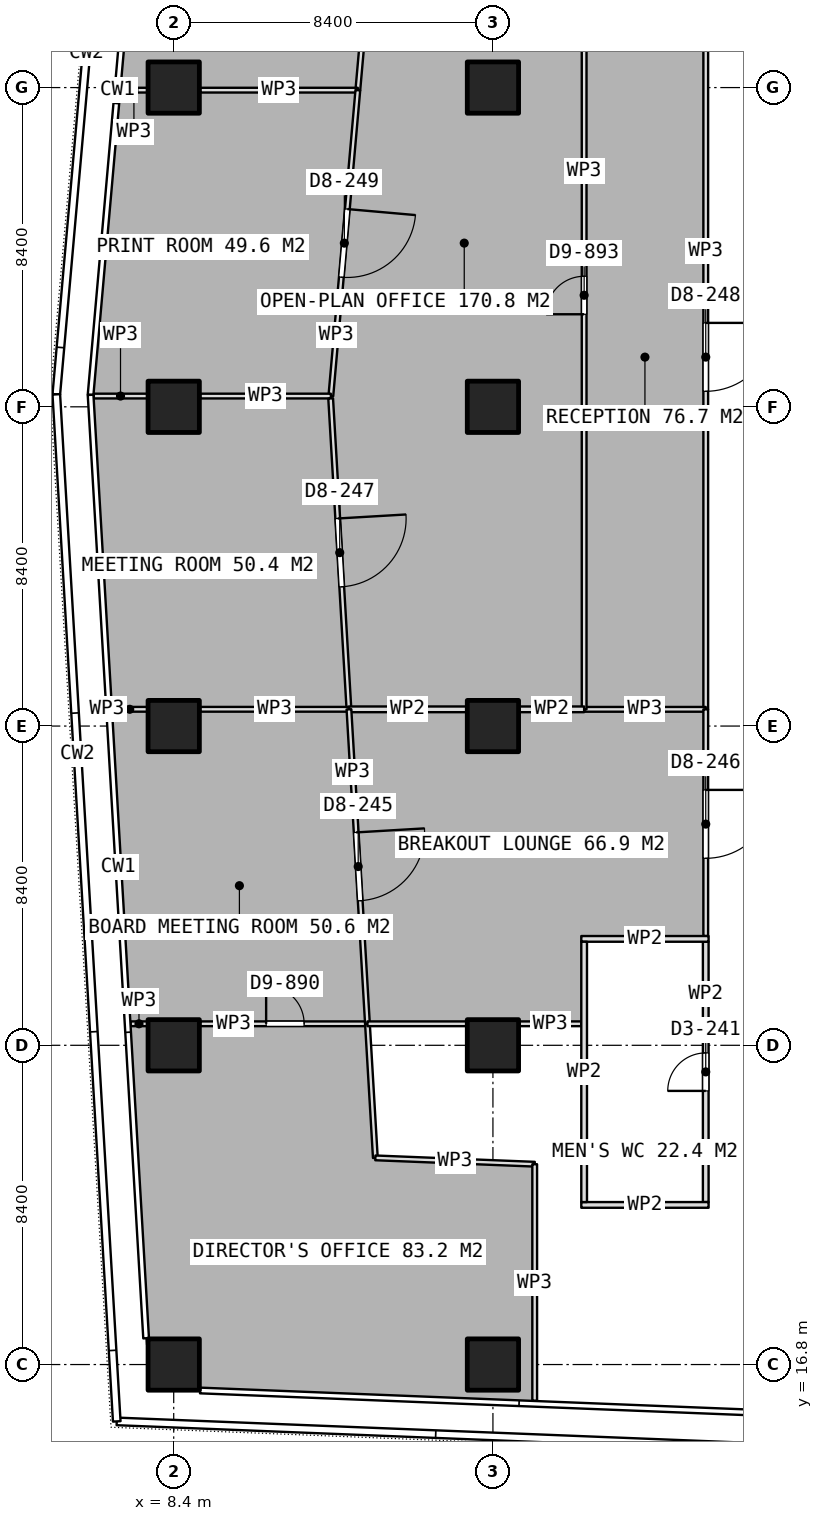
"""IFC4 building model, lengths in metres.
Left out: names, types, materials, properties, quantities, classifications, styles, units other than length and angle.
Written with IfcOpenShell. Run it as: python <this file> out.ifc"""

import sys

from ifc_helpers import new_model, si_unit, direction, frame, frame_2d, origin, origin_2d, place, context, subcontext, project, spatial, rectangle, extrude, element, fill, save


model = new_model("IFC4")
c1 = context("Model", 3, precision=1e-05, world=origin(), true_north=direction((0.0, 1.0)))
c2 = subcontext(c1, "Body", "Model", "MODEL_VIEW")
j1 = project(units=[si_unit("LENGTHUNIT", "METRE"), si_unit("PLANEANGLEUNIT", "RADIAN")], contexts=[c1])
p1 = place(None, origin())
s1 = spatial("IfcSite", under=j1, at=p1, CompositionType="ELEMENT")
p2 = place(p1, origin())
s2 = spatial("IfcBuilding", under=s1, at=p2, CompositionType="ELEMENT")
p3 = place(p2, frame((0.0, 0.0, 225.2)))
s3 = spatial("IfcBuildingStorey", under=s2, at=p3, CompositionType="ELEMENT", Elevation=225.2)
for number, where, z_axis, x_axis in (
    (1, (8.4, 16.8, 0.0), (0.0, 0.0, 1.0), (1.0, 0.0, 0.0)),
    (2, (8.4, 25.2, 0.0), (0.0, 0.0, 1.0), (1.0, 0.0, 0.0)),
    (3, (8.4, 33.6, 0.0), (0.0, 0.0, 1.0), (1.0, 0.0, 0.0)),
    (4, (8.4, 42.0, 0.0), (0.0, 0.0, 1.0), (1.0, 0.0, 0.0)),
    (5, (8.4, 50.4, 0.0), (0.0, 0.0, 1.0), (1.0, 0.0, 0.0)),
    (6, (16.8, 16.8, 0.0), (0.0, 0.0, 1.0), (1.0, 0.0, 0.0)),
    (7, (16.8, 25.2, 0.0), (0.0, 0.0, 1.0), (1.0, 0.0, 0.0)),
    (8, (16.8, 33.6, 0.0), (0.0, 0.0, 1.0), (1.0, 0.0, 0.0)),
    (9, (16.8, 42.0, 0.0), (0.0, 0.0, 1.0), (1.0, 0.0, 0.0)),
    (10, (16.8, 50.4, 0.0), (0.0, 0.0, 1.0), (1.0, 0.0, 0.0)),
):
    element("IfcColumn", number, at=place(p3, frame(where, z_axis=z_axis, x_axis=x_axis)), inside=s3, PredefinedType="COLUMN", context=c2, shape_type="SweptSolid", body=[
        extrude(rectangle(XDim=1.35, YDim=1.35, at=origin_2d()), origin(), (0.0, 0.0, 1.0), 3.75),
    ])
for number, where, z_axis, x_axis in (
    (11, (19.125, 21.0, 0.0), (0.0, 0.0, 1.0), (1.0, 0.0, 0.0)),
    (12, (19.125, 28.0, 0.0), (0.0, 0.0, 1.0), (1.0, 0.0, 0.0)),
):
    element("IfcWall", number, at=place(p3, frame(where, z_axis=z_axis, x_axis=x_axis)), inside=s3, PredefinedType="PARTITIONING", context=c2, shape_type="SweptSolid", body=[
        extrude(rectangle(XDim=3.35, YDim=0.15, at=frame_2d((1.675, 0.0))), origin(), (0.0, 0.0, 1.0), 3.5),
    ])
p4 = place(p3, frame((19.2, 21.075, 0.0), z_axis=(0.0, 0.0, 1.0), x_axis=(0.0, 1.0, 0.0)))
e13 = element("IfcWall", 13, at=p4, inside=s3, PredefinedType="PARTITIONING", context=c2, shape_type="SweptSolid", body=[
    extrude(rectangle(XDim=6.85, YDim=0.15, at=frame_2d((3.425, 0.0))), origin(), (0.0, 0.0, 1.0), 3.5),
])
p5 = place(p3, frame((22.4, 21.075, 0.0), z_axis=(0.0, 0.0, 1.0), x_axis=(0.0, 1.0, 0.0)))
e14 = element("IfcWall", 14, at=p5, inside=s3, PredefinedType="PARTITIONING", context=c2, shape_type="SweptSolid", body=[
    extrude(rectangle(XDim=6.85, YDim=0.15, at=frame_2d((3.425, 0.0))), origin(), (0.0, 0.0, 1.0), 3.5),
])
p6 = place(p5, frame((2.925, 0.0, 0.0)))
e15 = element("IfcOpeningElement", 15, at=p6, cuts=e14, PredefinedType="OPENING", context=c2, shape_type="SweptSolid", body=[
    extrude(rectangle(XDim=1.0, YDim=2.1, at=frame_2d((0.5, 1.05))), frame((0.0, 0.085, 0.0), z_axis=(0.0, -1.0, 0.0), x_axis=(1.0, 0.0, 0.0)), (0.0, 0.0, 1.0), 0.17),
])
p7 = place(p3, frame((13.593, 54.27, 0.0), z_axis=(0.0, 0.0, 1.0), x_axis=(-0.088001948608, -0.996120302494, 0.0)))
e16 = element("IfcWall", 16, at=p7, inside=s3, PredefinedType="PARTITIONING", context=c2, shape_type="SweptSolid", body=[
    extrude(rectangle(XDim=3.953, YDim=0.125, at=frame_2d((1.977, 0.0))), origin(), (0.0, 0.0, 1.0), 3.5),
])
p8 = place(p3, frame((13.245, 50.332, 0.0), z_axis=(0.0, 0.0, 1.0), x_axis=(-1.0, 0.0, 0.0)))
e17 = element("IfcWall", 17, at=p8, inside=s3, PredefinedType="PARTITIONING", context=c2, shape_type="SweptSolid", body=[
    extrude(rectangle(XDim=4.15, YDim=0.125, at=frame_2d((2.075, 0.0))), origin(), (0.0, 0.0, 1.0), 3.5),
])
p9 = place(p3, frame((7.705, 50.332, 0.0), z_axis=(0.0, 0.0, 1.0), x_axis=(-1.0, 0.0, 0.0)))
e18 = element("IfcWall", 18, at=p9, inside=s3, PredefinedType="PARTITIONING", context=c2, shape_type="SweptSolid", body=[
    extrude(rectangle(XDim=0.704, YDim=0.125, at=frame_2d((0.352, 0.0))), origin(), (0.0, 0.0, 1.0), 3.5),
])
p10 = place(p3, frame((13.245, 50.331, 0.0), z_axis=(0.0, 0.0, 1.0), x_axis=(-0.087903511106, -0.996128994024, 0.0)))
e19 = element("IfcWall", 19, at=p10, inside=s3, PredefinedType="PARTITIONING", context=c2, shape_type="SweptSolid", body=[
    extrude(rectangle(XDim=8.079, YDim=0.125, at=frame_2d((4.04, 0.0))), origin(), (0.0, 0.0, 1.0), 3.5),
])
p11 = place(p10, frame((3.14, 0.0, 0.0)))
e20 = element("IfcOpeningElement", 20, at=p11, cuts=e19, PredefinedType="OPENING", context=c2, shape_type="SweptSolid", body=[
    extrude(rectangle(XDim=1.8, YDim=2.1, at=frame_2d((0.9, 1.05))), frame((0.0, 0.073, 0.0), z_axis=(0.0, -1.0, 0.0), x_axis=(1.0, 0.0, 0.0)), (0.0, 0.0, 1.0), 0.145),
])
p12 = place(p3, frame((12.535, 42.283, 0.0), z_axis=(0.0, 0.0, 1.0), x_axis=(-1.0, 0.0, 0.0)))
e21 = element("IfcWall", 21, at=p12, inside=s3, PredefinedType="PARTITIONING", context=c2, shape_type="SweptSolid", body=[
    extrude(rectangle(XDim=3.44, YDim=0.125, at=frame_2d((1.72, 0.0))), origin(), (0.0, 0.0, 1.0), 3.5),
])
p13 = place(p3, frame((7.705, 42.283, 0.0), z_axis=(0.0, 0.0, 1.0), x_axis=(-1.0, 0.0, 0.0)))
e22 = element("IfcWall", 22, at=p13, inside=s3, PredefinedType="PARTITIONING", context=c2, shape_type="SweptSolid", body=[
    extrude(rectangle(XDim=1.41, YDim=0.125, at=frame_2d((0.705, 0.0))), origin(), (0.0, 0.0, 1.0), 3.5),
])
p14 = place(p3, frame((12.53, 42.221, 0.0), z_axis=(0.0, 0.0, 1.0), x_axis=(0.058695823025, -0.998275913943, 0.0)))
e23 = element("IfcWall", 23, at=p14, inside=s3, PredefinedType="PARTITIONING", context=c2, shape_type="SweptSolid", body=[
    extrude(rectangle(XDim=8.194, YDim=0.125, at=frame_2d((4.097, 0.0))), origin(), (0.0, 0.0, 1.0), 3.5),
])
p15 = place(p14, frame((3.165, 0.0, 0.0)))
e24 = element("IfcOpeningElement", 24, at=p15, cuts=e23, PredefinedType="OPENING", context=c2, shape_type="SweptSolid", body=[
    extrude(rectangle(XDim=1.8, YDim=2.1, at=frame_2d((0.9, 1.05))), frame((0.0, 0.073, 0.0), z_axis=(0.0, -1.0, 0.0), x_axis=(1.0, 0.0, 0.0)), (0.0, 0.0, 1.0), 0.145),
])
p16 = place(p3, frame((13.011, 34.041, 0.0), z_axis=(0.0, 0.0, 1.0), x_axis=(-1.0, 0.0, 0.0)))
e25 = element("IfcWall", 25, at=p16, inside=s3, PredefinedType="PARTITIONING", context=c2, shape_type="SweptSolid", body=[
    extrude(rectangle(XDim=3.916, YDim=0.125, at=frame_2d((1.958, 0.0))), origin(), (0.0, 0.0, 1.0), 3.5),
])
p17 = place(p3, frame((7.705, 34.041, 0.0), z_axis=(0.0, 0.0, 1.0), x_axis=(-1.0, 0.0, 0.0)))
e26 = element("IfcWall", 26, at=p17, inside=s3, PredefinedType="PARTITIONING", context=c2, shape_type="SweptSolid", body=[
    extrude(rectangle(XDim=0.925, YDim=0.125, at=frame_2d((0.462, 0.0))), origin(), (0.0, 0.0, 1.0), 3.5),
])
p18 = place(p3, frame((7.267, 25.766, 0.0), z_axis=(0.0, 0.0, 1.0), x_axis=(1.0, 0.0, 0.0)))
e27 = element("IfcWall", 27, at=p18, inside=s3, PredefinedType="PARTITIONING", context=c2, shape_type="SweptSolid", body=[
    extrude(rectangle(XDim=0.438, YDim=0.125, at=frame_2d((0.219, 0.0))), origin(), (0.0, 0.0, 1.0), 3.5),
])
p19 = place(p3, frame((9.095, 25.766, 0.0), z_axis=(0.0, 0.0, 1.0), x_axis=(1.0, 0.0, 0.0)))
e28 = element("IfcWall", 28, at=p19, inside=s3, PredefinedType="PARTITIONING", context=c2, shape_type="SweptSolid", body=[
    extrude(rectangle(XDim=4.403, YDim=0.125, at=frame_2d((2.202, 0.0))), origin(), (0.0, 0.0, 1.0), 3.5),
])
p20 = place(p19, frame((1.737, 0.0, 0.0)))
e29 = element("IfcOpeningElement", 29, at=p20, cuts=e28, PredefinedType="OPENING", context=c2, shape_type="SweptSolid", body=[
    extrude(rectangle(XDim=1.0, YDim=2.1, at=frame_2d((0.5, 1.05))), frame((0.0, 0.073, 0.0), z_axis=(0.0, -1.0, 0.0), x_axis=(1.0, 0.0, 0.0)), (0.0, 0.0, 1.0), 0.145),
])
p21 = place(p3, frame((13.498, 25.766, 0.0), z_axis=(0.0, 0.0, 1.0), x_axis=(0.058855654346, -0.998266503471, 0.0)))
e30 = element("IfcWall", 30, at=p21, inside=s3, PredefinedType="PARTITIONING", context=c2, shape_type="SweptSolid", body=[
    extrude(rectangle(XDim=3.534, YDim=0.125, at=frame_2d((1.767, 0.0))), origin(), (0.0, 0.0, 1.0), 3.5),
])
p22 = place(p3, frame((13.706, 22.238, 0.0), z_axis=(0.0, 0.0, 1.0), x_axis=(0.999207821605, -0.039796095841, 0.0)))
e31 = element("IfcWall", 31, at=p22, inside=s3, PredefinedType="PARTITIONING", context=c2, shape_type="SweptSolid", body=[
    extrude(rectangle(XDim=4.196, YDim=0.125, at=frame_2d((2.098, 0.0))), origin(), (0.0, 0.0, 1.0), 3.5),
])
p23 = place(p3, frame((17.899, 22.071, 0.0), z_axis=(0.0, 0.0, 1.0), x_axis=(0.0, -1.0, 0.0)))
e32 = element("IfcWall", 32, at=p23, inside=s3, PredefinedType="PARTITIONING", context=c2, shape_type="SweptSolid", body=[
    extrude(rectangle(XDim=6.225, YDim=0.125, at=frame_2d((3.113, 0.0))), origin(), (0.0, 0.0, 1.0), 3.5),
])
p24 = place(p3, frame((22.4, 52.575, 0.0), z_axis=(0.0, 0.0, 1.0), x_axis=(0.0, -1.0, 0.0)))
e33 = element("IfcWall", 33, at=p24, inside=s3, PredefinedType="PARTITIONING", context=c2, shape_type="SweptSolid", body=[
    extrude(rectangle(XDim=18.535, YDim=0.125, at=frame_2d((9.268, 0.0))), origin(), (0.0, 0.0, 1.0), 3.5),
])
p25 = place(p24, frame((8.367, 0.0, 0.0)))
e34 = element("IfcOpeningElement", 34, at=p25, cuts=e33, PredefinedType="OPENING", context=c2, shape_type="SweptSolid", body=[
    extrude(rectangle(XDim=1.8, YDim=2.1, at=frame_2d((0.9, 1.05))), frame((0.0, 0.073, 0.0), z_axis=(0.0, -1.0, 0.0), x_axis=(1.0, 0.0, 0.0)), (0.0, 0.0, 1.0), 0.145),
])
p26 = place(p3, frame((22.4, 34.04, 0.0), z_axis=(0.0, 0.0, 1.0), x_axis=(-1.0, 0.0, 0.0)))
e35 = element("IfcWall", 35, at=p26, inside=s3, PredefinedType="PARTITIONING", context=c2, shape_type="SweptSolid", body=[
    extrude(rectangle(XDim=3.2, YDim=0.125, at=frame_2d((1.6, 0.0))), origin(), (0.0, 0.0, 1.0), 3.5),
])
p27 = place(p3, frame((19.2, 34.04, 0.0), z_axis=(0.0, 0.0, 1.0), x_axis=(0.0, 1.0, 0.0)))
e36 = element("IfcWall", 36, at=p27, inside=s3, PredefinedType="PARTITIONING", context=c2, shape_type="SweptSolid", body=[
    extrude(rectangle(XDim=21.789, YDim=0.125, at=frame_2d((10.895, 0.0))), origin(), (0.0, 0.0, 1.0), 3.5),
])
p28 = place(p27, frame((10.395, 0.0, 0.0)))
e37 = element("IfcOpeningElement", 37, at=p28, cuts=e36, PredefinedType="OPENING", context=c2, shape_type="SweptSolid", body=[
    extrude(rectangle(XDim=1.0, YDim=2.1, at=frame_2d((0.5, 1.05))), frame((0.0, 0.073, 0.0), z_axis=(0.0, -1.0, 0.0), x_axis=(1.0, 0.0, 0.0)), (0.0, 0.0, 1.0), 0.145),
])
p29 = place(p3, frame((19.2, 34.04, 0.0), z_axis=(0.0, 0.0, 1.0), x_axis=(-1.0, 0.0, 0.0)))
e38 = element("IfcWall", 38, at=p29, inside=s3, PredefinedType="PARTITIONING", context=c2, shape_type="SweptSolid", body=[
    extrude(rectangle(XDim=1.705, YDim=0.15, at=frame_2d((0.853, 0.0))), origin(), (0.0, 0.0, 1.0), 3.5),
])
p30 = place(p3, frame((16.105, 34.04, 0.0), z_axis=(0.0, 0.0, 1.0), x_axis=(-1.0, 0.0, 0.0)))
e39 = element("IfcWall", 39, at=p30, inside=s3, PredefinedType="PARTITIONING", context=c2, shape_type="SweptSolid", body=[
    extrude(rectangle(XDim=3.094, YDim=0.15, at=frame_2d((1.547, 0.0))), origin(), (0.0, 0.0, 1.0), 3.5),
])
p31 = place(p3, frame((13.011, 34.04, 0.0), z_axis=(0.0, 0.0, 1.0), x_axis=(0.058765190518, -0.998271832911, 0.0)))
e40 = element("IfcWall", 40, at=p31, inside=s3, PredefinedType="PARTITIONING", context=c2, shape_type="SweptSolid", body=[
    extrude(rectangle(XDim=8.288, YDim=0.125, at=frame_2d((4.144, 0.0))), origin(), (0.0, 0.0, 1.0), 3.5),
])
p32 = place(p31, frame((3.244, 0.0, 0.0)))
e41 = element("IfcOpeningElement", 41, at=p32, cuts=e40, PredefinedType="OPENING", context=c2, shape_type="SweptSolid", body=[
    extrude(rectangle(XDim=1.8, YDim=2.1, at=frame_2d((0.9, 1.05))), frame((0.0, 0.073, 0.0), z_axis=(0.0, -1.0, 0.0), x_axis=(1.0, 0.0, 0.0)), (0.0, 0.0, 1.0), 0.145),
])
p33 = place(p3, frame((19.125, 25.766, 0.0), z_axis=(0.0, 0.0, 1.0), x_axis=(-1.0, 0.0, 0.0)))
e42 = element("IfcWall", 42, at=p33, inside=s3, PredefinedType="PARTITIONING", context=c2, shape_type="SweptSolid", body=[
    extrude(rectangle(XDim=1.63, YDim=0.125, at=frame_2d((0.815, 0.0))), origin(), (0.0, 0.0, 1.0), 3.5),
])
p34 = place(p3, frame((16.105, 25.766, 0.0), z_axis=(0.0, 0.0, 1.0), x_axis=(-1.0, 0.0, 0.0)))
e43 = element("IfcWall", 43, at=p34, inside=s3, PredefinedType="PARTITIONING", context=c2, shape_type="SweptSolid", body=[
    extrude(rectangle(XDim=2.607, YDim=0.125, at=frame_2d((1.303, 0.0))), origin(), (0.0, 0.0, 1.0), 3.5),
])
p35 = place(p3, frame((22.4, 34.04, 0.0), z_axis=(0.0, 0.0, 1.0), x_axis=(0.0, -1.0, 0.0)))
e44 = element("IfcWall", 44, at=p35, inside=s3, PredefinedType="PARTITIONING", context=c2, shape_type="SweptSolid", body=[
    extrude(rectangle(XDim=5.965, YDim=0.125, at=frame_2d((2.982, 0.0))), origin(), (0.0, 0.0, 1.0), 3.5),
])
p36 = place(p35, frame((2.12, 0.0, 0.0)))
e45 = element("IfcOpeningElement", 45, at=p36, cuts=e44, PredefinedType="OPENING", context=c2, shape_type="SweptSolid", body=[
    extrude(rectangle(XDim=1.8, YDim=2.1, at=frame_2d((0.9, 1.05))), frame((0.0, 0.073, 0.0), z_axis=(0.0, -1.0, 0.0), x_axis=(1.0, 0.0, 0.0)), (0.0, 0.0, 1.0), 0.145),
])
p37 = place(p6, origin())
e46 = element("IfcDoor", 46, at=p37, inside=s3, OperationType="SINGLE_SWING_LEFT", PredefinedType="DOOR", context=c2, shape_type="SweptSolid", body=[
    extrude(rectangle(XDim=1.0, YDim=2.1, at=frame_2d((0.5, 1.05))), frame((0.0, 0.025, 0.0), z_axis=(0.0, -1.0, 0.0), x_axis=(1.0, 0.0, 0.0)), (0.0, 0.0, 1.0), 0.05),
])
fill(e15, e46)
p38 = place(p11, origin())
e47 = element("IfcDoor", 47, at=p38, inside=s3, OperationType="DOUBLE_DOOR_SINGLE_SWING", PredefinedType="DOOR", context=c2, shape_type="SweptSolid", body=[
    extrude(rectangle(XDim=1.8, YDim=2.1, at=frame_2d((0.9, 1.05))), frame((0.0, 0.025, 0.0), z_axis=(0.0, -1.0, 0.0), x_axis=(1.0, 0.0, 0.0)), (0.0, 0.0, 1.0), 0.05),
])
fill(e20, e47)
p39 = place(p15, origin())
e48 = element("IfcDoor", 48, at=p39, inside=s3, OperationType="DOUBLE_DOOR_SINGLE_SWING", PredefinedType="DOOR", context=c2, shape_type="SweptSolid", body=[
    extrude(rectangle(XDim=1.8, YDim=2.1, at=frame_2d((0.9, 1.05))), frame((0.0, 0.025, 0.0), z_axis=(0.0, -1.0, 0.0), x_axis=(1.0, 0.0, 0.0)), (0.0, 0.0, 1.0), 0.05),
])
fill(e24, e48)
p40 = place(p25, origin())
e49 = element("IfcDoor", 49, at=p40, inside=s3, OperationType="DOUBLE_DOOR_SINGLE_SWING", PredefinedType="DOOR", context=c2, shape_type="SweptSolid", body=[
    extrude(rectangle(XDim=1.8, YDim=2.1, at=frame_2d((0.9, 1.05))), frame((0.0, 0.025, 0.0), z_axis=(0.0, -1.0, 0.0), x_axis=(1.0, 0.0, 0.0)), (0.0, 0.0, 1.0), 0.05),
])
fill(e34, e49)
p41 = place(p36, origin())
e50 = element("IfcDoor", 50, at=p41, inside=s3, OperationType="DOUBLE_DOOR_SINGLE_SWING", PredefinedType="DOOR", context=c2, shape_type="SweptSolid", body=[
    extrude(rectangle(XDim=1.8, YDim=2.1, at=frame_2d((0.9, 1.05))), frame((0.0, 0.025, 0.0), z_axis=(0.0, -1.0, 0.0), x_axis=(1.0, 0.0, 0.0)), (0.0, 0.0, 1.0), 0.05),
])
fill(e45, e50)
p42 = place(p28, origin())
e51 = element("IfcDoor", 51, at=p42, inside=s3, OperationType="SINGLE_SWING_LEFT", PredefinedType="DOOR", context=c2, shape_type="SweptSolid", body=[
    extrude(rectangle(XDim=1.0, YDim=2.1, at=frame_2d((0.5, 1.05))), frame((0.0, 0.025, 0.0), z_axis=(0.0, -1.0, 0.0), x_axis=(1.0, 0.0, 0.0)), (0.0, 0.0, 1.0), 0.05),
])
fill(e37, e51)
p43 = place(p32, origin())
e52 = element("IfcDoor", 52, at=p43, inside=s3, OperationType="DOUBLE_DOOR_SINGLE_SWING", PredefinedType="DOOR", context=c2, shape_type="SweptSolid", body=[
    extrude(rectangle(XDim=1.8, YDim=2.1, at=frame_2d((0.9, 1.05))), frame((0.0, 0.025, 0.0), z_axis=(0.0, -1.0, 0.0), x_axis=(1.0, 0.0, 0.0)), (0.0, 0.0, 1.0), 0.05),
])
fill(e41, e52)
p44 = place(p20, origin())
e53 = element("IfcDoor", 53, at=p44, inside=s3, OperationType="SINGLE_SWING_LEFT", PredefinedType="DOOR", context=c2, shape_type="SweptSolid", body=[
    extrude(rectangle(XDim=1.0, YDim=2.1, at=frame_2d((0.5, 1.05))), frame((0.0, 0.025, 0.0), z_axis=(0.0, -1.0, 0.0), x_axis=(1.0, 0.0, 0.0)), (0.0, 0.0, 1.0), 0.05),
])
fill(e29, e53)
save(model, sys.argv[1])
